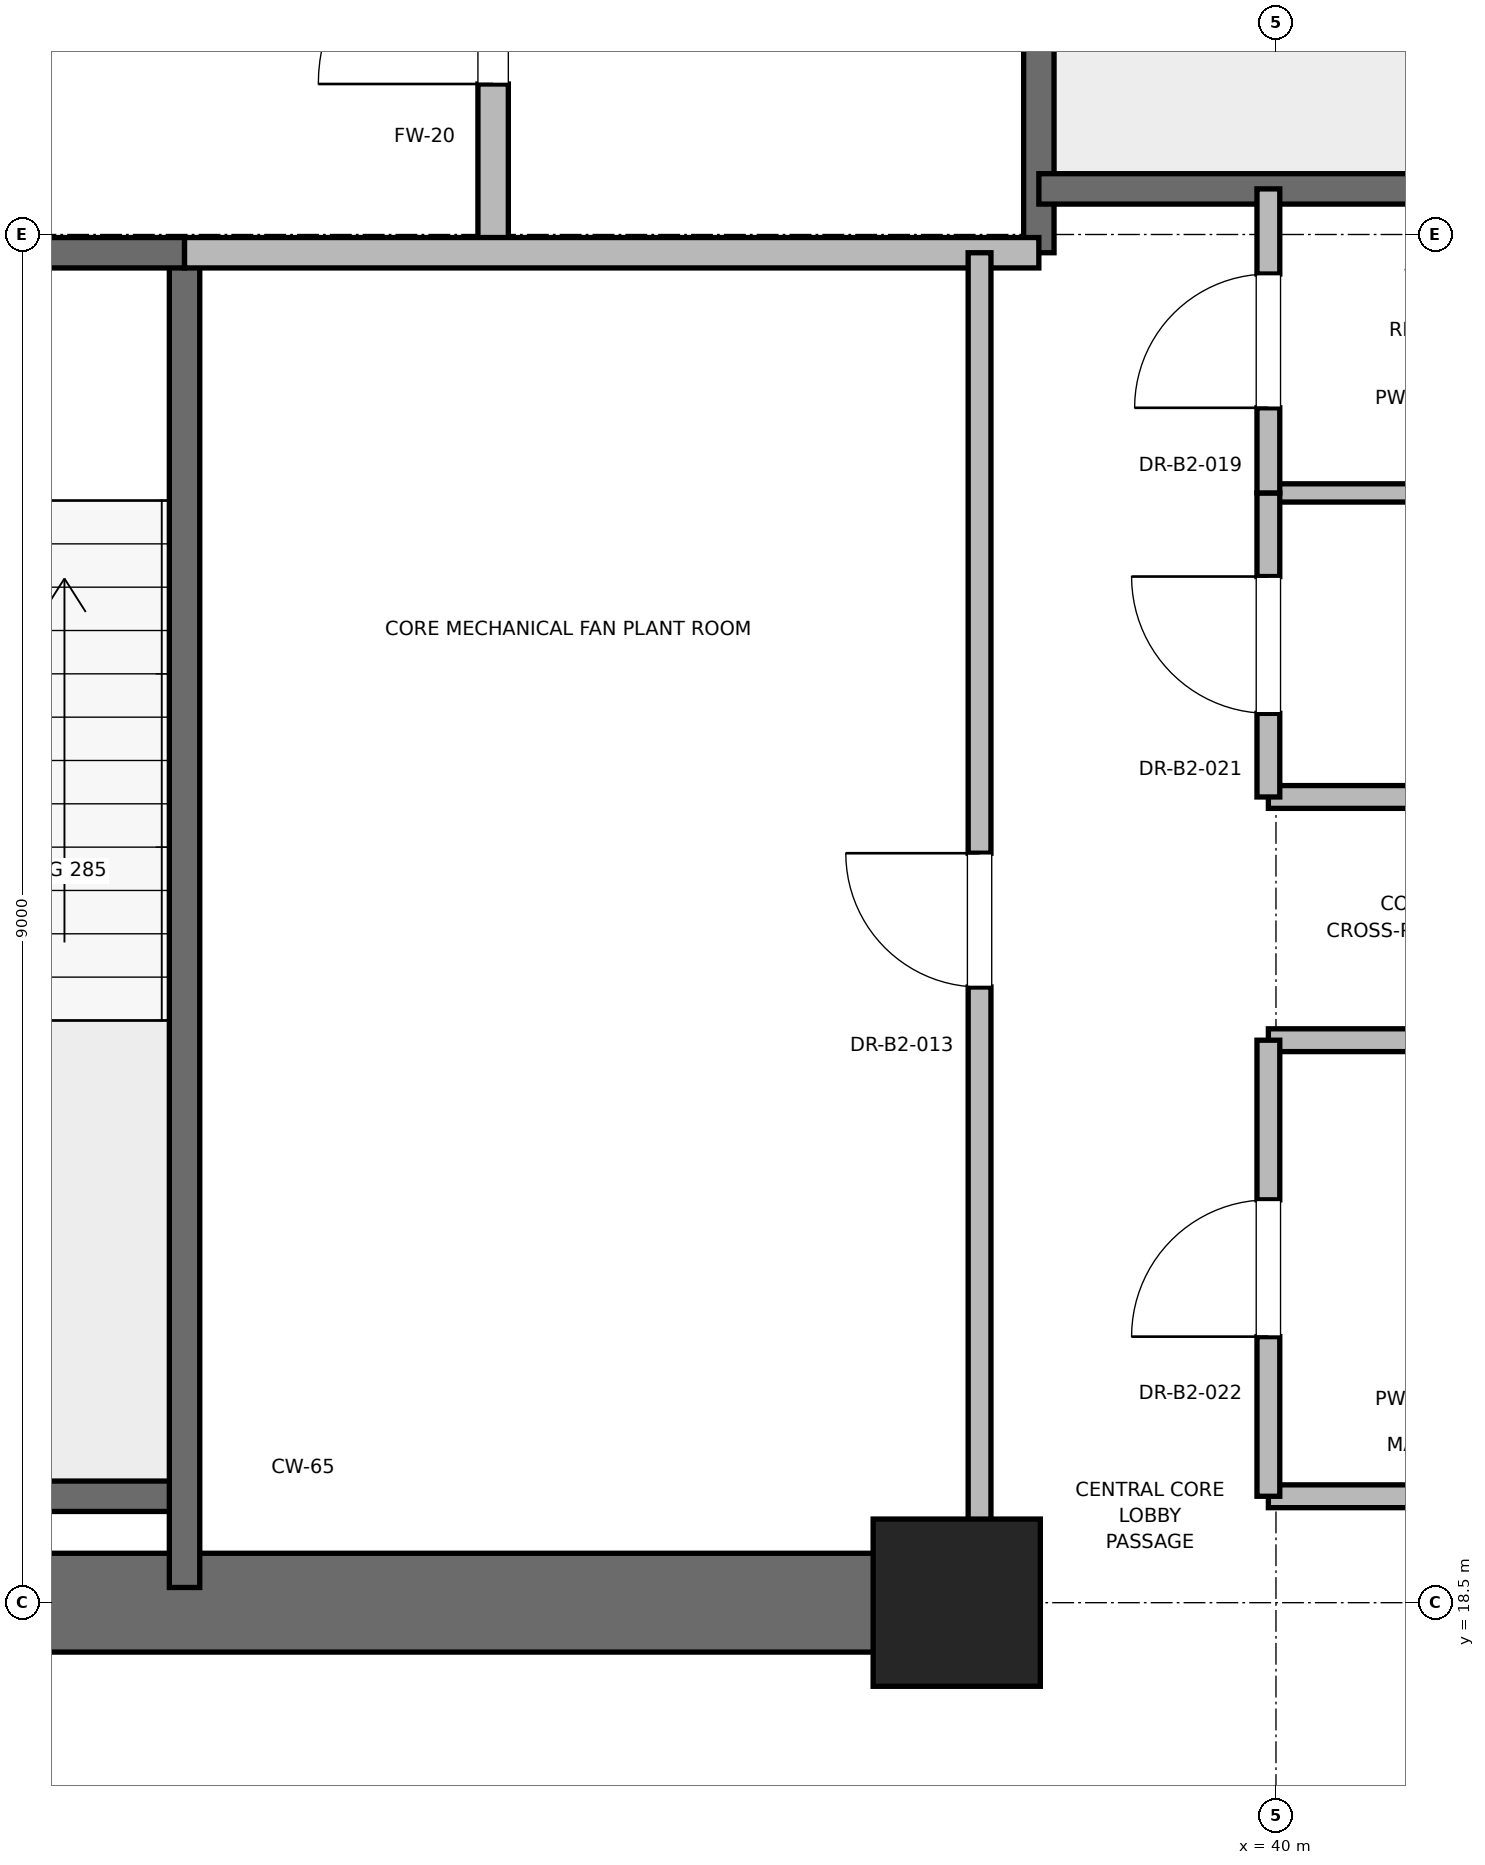
"""IFC4 building model, lengths in metres.
Left out: names, types, materials, properties, quantities, classifications, styles, units other than length and angle.
Written with IfcOpenShell. Run it as: python <this file> out.ifc"""

import sys

from ifc_helpers import new_model, si_unit, direction, frame, frame_2d, origin, origin_2d, place, context, subcontext, project, spatial, rectangle, extrude, element, fill, save


model = new_model("IFC4")
c1 = context("Model", 3, precision=1e-05, world=origin(), true_north=direction((0.0, 1.0)))
c2 = subcontext(c1, "Body", "Model", "MODEL_VIEW")
j1 = project(units=[si_unit("LENGTHUNIT", "METRE"), si_unit("PLANEANGLEUNIT", "RADIAN")], contexts=[c1])
p1 = place(None, origin())
s1 = spatial("IfcSite", under=j1, at=p1, CompositionType="ELEMENT")
p2 = place(p1, origin())
s2 = spatial("IfcBuilding", under=s1, at=p2, CompositionType="ELEMENT")
p3 = place(p2, frame((0.0, 0.0, -9.0)))
s3 = spatial("IfcBuildingStorey", under=s2, at=p3, CompositionType="ELEMENT", Elevation=-9.0)
p4 = place(p3, frame((37.9, 18.5, -0.3), z_axis=(0.0, 0.0, 1.0), x_axis=(1.0, 0.0, 0.0)))
e1 = element("IfcColumn", 1, at=p4, inside=s3, PredefinedType="PILASTER", context=c2, shape_type="SweptSolid", body=[
    extrude(rectangle(XDim=1.1, YDim=1.1, at=origin_2d()), origin(), (0.0, 0.0, 1.0), 4.8),
])
p5 = place(p3, frame((29.0, 18.5, -0.3), z_axis=(0.0, 0.0, 1.0), x_axis=(1.0, 0.0, 0.0)))
e2 = element("IfcWall", 2, at=p5, inside=s3, PredefinedType="SHEAR", context=c2, shape_type="SweptSolid", body=[
    extrude(rectangle(XDim=9.2, YDim=0.65, at=frame_2d((4.6, 0.0))), origin(), (0.0, 0.0, 1.0), 4.5),
])
p6 = place(p3, frame((29.7, 19.2, -0.3), z_axis=(0.0, 0.0, 1.0), x_axis=(1.0, 0.0, 0.0)))
e3 = element("IfcWall", 3, at=p6, inside=s3, PredefinedType="SOLIDWALL", context=c2, shape_type="SweptSolid", body=[
    extrude(rectangle(XDim=3.12, YDim=0.2, at=frame_2d((1.56, 0.0))), origin(), (0.0, 0.0, 1.0), 4.5),
])
p7 = place(p3, frame((32.82, 18.6, -0.3), z_axis=(0.0, 0.0, 1.0), x_axis=(0.0, 1.0, 0.0)))
e4 = element("IfcWall", 4, at=p7, inside=s3, PredefinedType="SOLIDWALL", context=c2, shape_type="SweptSolid", body=[
    extrude(rectangle(XDim=8.78, YDim=0.2, at=frame_2d((4.39, 0.0))), origin(), (0.0, 0.0, 1.0), 4.5),
])
p8 = place(p3, frame((29.7, 27.38, -0.3), z_axis=(0.0, 0.0, 1.0), x_axis=(1.0, 0.0, 0.0)))
e5 = element("IfcWall", 5, at=p8, inside=s3, PredefinedType="SOLIDWALL", context=c2, shape_type="SweptSolid", body=[
    extrude(rectangle(XDim=3.12, YDim=0.2, at=frame_2d((1.56, 0.0))), origin(), (0.0, 0.0, 1.0), 4.5),
])
p9 = place(p8, frame((1.01, 0.0, 0.3)))
e6 = element("IfcOpeningElement", 6, at=p9, cuts=e5, PredefinedType="OPENING", context=c2, shape_type="SweptSolid", body=[
    extrude(rectangle(XDim=1.1, YDim=2.15, at=frame_2d((0.55, 1.075))), frame((0.0, 0.1, 0.0), z_axis=(0.0, -1.0, 0.0), x_axis=(1.0, 0.0, 0.0)), (0.0, 0.0, 1.0), 0.2),
])
p10 = place(p3, frame((38.44, 27.38, -0.3), z_axis=(0.0, 0.0, 1.0), x_axis=(0.0, 1.0, 0.0)))
e7 = element("IfcWall", 7, at=p10, inside=s3, PredefinedType="SOLIDWALL", context=c2, shape_type="SweptSolid", body=[
    extrude(rectangle(XDim=8.87, YDim=0.2, at=frame_2d((4.435, 0.0))), origin(), (0.0, 0.0, 1.0), 4.5),
])
p11 = place(p3, frame((38.44, 27.8, -0.3), z_axis=(0.0, 0.0, 1.0), x_axis=(1.0, 0.0, 0.0)))
e8 = element("IfcWall", 8, at=p11, inside=s3, PredefinedType="SOLIDWALL", context=c2, shape_type="SweptSolid", body=[
    extrude(rectangle(XDim=3.32, YDim=0.2, at=frame_2d((1.66, 0.0))), origin(), (0.0, 0.0, 1.0), 4.5),
])
p12 = place(p3, frame((34.85, 27.38, 0.0), z_axis=(0.0, 0.0, 1.0), x_axis=(0.0, 1.0, 0.0)))
e9 = element("IfcWall", 9, at=p12, inside=s3, PredefinedType="PARTITIONING", context=c2, shape_type="SweptSolid", body=[
    extrude(rectangle(XDim=3.37, YDim=0.2, at=frame_2d((1.685, 0.0))), origin(), (0.0, 0.0, 1.0), 4.2),
])
p13 = place(p12, frame((1.11, 0.0, 0.0)))
e10 = element("IfcOpeningElement", 10, at=p13, cuts=e9, PredefinedType="OPENING", context=c2, shape_type="SweptSolid", body=[
    extrude(rectangle(XDim=1.15, YDim=2.2, at=frame_2d((0.575, 1.1))), frame((0.0, 0.1, 0.0), z_axis=(0.0, -1.0, 0.0), x_axis=(1.0, 0.0, 0.0)), (0.0, 0.0, 1.0), 0.2),
])
p14 = place(p3, frame((32.82, 27.38, 0.0), z_axis=(0.0, 0.0, 1.0), x_axis=(1.0, 0.0, 0.0)))
e11 = element("IfcWall", 11, at=p14, inside=s3, PredefinedType="PARTITIONING", context=c2, shape_type="SweptSolid", body=[
    extrude(rectangle(XDim=5.62, YDim=0.2, at=frame_2d((2.81, 0.0))), origin(), (0.0, 0.0, 1.0), 4.2),
])
for number, where, z_axis, x_axis in (
    (12, (39.95, 19.2, 0.0), (0.0, 0.0, 1.0), (1.0, 0.0, 0.0)),
    (13, (39.95, 22.2, 0.0), (0.0, 0.0, 1.0), (1.0, 0.0, 0.0)),
    (14, (39.95, 23.8, 0.0), (0.0, 0.0, 1.0), (1.0, 0.0, 0.0)),
):
    element("IfcWall", number, at=place(p3, frame(where, z_axis=z_axis, x_axis=x_axis)), inside=s3, PredefinedType="PARTITIONING", context=c2, shape_type="SweptSolid", body=[
        extrude(rectangle(XDim=1.81, YDim=0.15, at=frame_2d((0.905, 0.0))), origin(), (0.0, 0.0, 1.0), 2.85),
    ])
p15 = place(p3, frame((39.95, 25.8, 0.0), z_axis=(0.0, 0.0, 1.0), x_axis=(1.0, 0.0, 0.0)))
e15 = element("IfcWall", 15, at=p15, inside=s3, PredefinedType="PARTITIONING", context=c2, shape_type="SweptSolid", body=[
    extrude(rectangle(XDim=1.81, YDim=0.12, at=frame_2d((0.905, 0.0))), origin(), (0.0, 0.0, 1.0), 2.85),
])
p16 = place(p3, frame((39.95, 19.2, 0.0), z_axis=(0.0, 0.0, 1.0), x_axis=(0.0, 1.0, 0.0)))
e16 = element("IfcWall", 16, at=p16, inside=s3, PredefinedType="PARTITIONING", context=c2, shape_type="SweptSolid", body=[
    extrude(rectangle(XDim=3.0, YDim=0.15, at=frame_2d((1.5, 0.0))), origin(), (0.0, 0.0, 1.0), 2.85),
])
p17 = place(p16, frame((1.05, 0.0, 0.0)))
e17 = element("IfcOpeningElement", 17, at=p17, cuts=e16, PredefinedType="OPENING", context=c2, shape_type="SweptSolid", body=[
    extrude(rectangle(XDim=0.9, YDim=2.1, at=frame_2d((0.45, 1.05))), frame((0.0, 0.075, 0.0), z_axis=(0.0, -1.0, 0.0), x_axis=(1.0, 0.0, 0.0)), (0.0, 0.0, 1.0), 0.15),
])
p18 = place(p3, frame((39.95, 23.8, 0.0), z_axis=(0.0, 0.0, 1.0), x_axis=(0.0, 1.0, 0.0)))
e18 = element("IfcWall", 18, at=p18, inside=s3, PredefinedType="PARTITIONING", context=c2, shape_type="SweptSolid", body=[
    extrude(rectangle(XDim=2.0, YDim=0.15, at=frame_2d((1.0, 0.0))), origin(), (0.0, 0.0, 1.0), 2.85),
])
p19 = place(p18, frame((0.55, 0.0, 0.0)))
e19 = element("IfcOpeningElement", 19, at=p19, cuts=e18, PredefinedType="OPENING", context=c2, shape_type="SweptSolid", body=[
    extrude(rectangle(XDim=0.9, YDim=2.1, at=frame_2d((0.45, 1.05))), frame((0.0, 0.075, 0.0), z_axis=(0.0, -1.0, 0.0), x_axis=(1.0, 0.0, 0.0)), (0.0, 0.0, 1.0), 0.15),
])
p20 = place(p3, frame((39.95, 25.8, 0.0), z_axis=(0.0, 0.0, 1.0), x_axis=(0.0, 1.0, 0.0)))
e20 = element("IfcWall", 20, at=p20, inside=s3, PredefinedType="PARTITIONING", context=c2, shape_type="SweptSolid", body=[
    extrude(rectangle(XDim=2.0, YDim=0.15, at=frame_2d((1.0, 0.0))), origin(), (0.0, 0.0, 1.0), 2.85),
])
p21 = place(p20, frame((0.56, 0.0, 0.0)))
e21 = element("IfcOpeningElement", 21, at=p21, cuts=e20, PredefinedType="OPENING", context=c2, shape_type="SweptSolid", body=[
    extrude(rectangle(XDim=0.88, YDim=2.1, at=frame_2d((0.44, 1.05))), frame((0.0, 0.075, 0.0), z_axis=(0.0, -1.0, 0.0), x_axis=(1.0, 0.0, 0.0)), (0.0, 0.0, 1.0), 0.15),
])
p22 = place(p3, frame((38.05, 18.6, 0.0), z_axis=(0.0, 0.0, 1.0), x_axis=(0.0, 1.0, 0.0)))
e22 = element("IfcWall", 22, at=p22, inside=s3, PredefinedType="PARTITIONING", context=c2, shape_type="SweptSolid", body=[
    extrude(rectangle(XDim=8.78, YDim=0.15, at=frame_2d((4.39, 0.0))), origin(), (0.0, 0.0, 1.0), 2.85),
])
p23 = place(p22, frame((3.95, 0.0, 0.0)))
e23 = element("IfcOpeningElement", 23, at=p23, cuts=e22, PredefinedType="OPENING", context=c2, shape_type="SweptSolid", body=[
    extrude(rectangle(XDim=0.88, YDim=2.1, at=frame_2d((0.44, 1.05))), frame((0.0, 0.075, 0.0), z_axis=(0.0, -1.0, 0.0), x_axis=(1.0, 0.0, 0.0)), (0.0, 0.0, 1.0), 0.15),
])
p24 = place(p13, origin())
e24 = element("IfcDoor", 24, at=p24, inside=s3, OperationType="SINGLE_SWING_LEFT", PredefinedType="DOOR", context=c2, shape_type="SweptSolid", body=[
    extrude(rectangle(XDim=1.15, YDim=2.2, at=frame_2d((0.575, 1.1))), frame((0.0, 0.025, 0.0), z_axis=(0.0, -1.0, 0.0), x_axis=(1.0, 0.0, 0.0)), (0.0, 0.0, 1.0), 0.05),
])
fill(e10, e24)
p25 = place(p17, origin())
e25 = element("IfcDoor", 25, at=p25, inside=s3, OperationType="SINGLE_SWING_LEFT", PredefinedType="DOOR", context=c2, shape_type="SweptSolid", body=[
    extrude(rectangle(XDim=0.9, YDim=2.1, at=frame_2d((0.45, 1.05))), frame((0.0, 0.025, 0.0), z_axis=(0.0, -1.0, 0.0), x_axis=(1.0, 0.0, 0.0)), (0.0, 0.0, 1.0), 0.05),
])
fill(e17, e25)
p26 = place(p19, origin())
e26 = element("IfcDoor", 26, at=p26, inside=s3, OperationType="SINGLE_SWING_RIGHT", PredefinedType="DOOR", context=c2, shape_type="SweptSolid", body=[
    extrude(rectangle(XDim=0.9, YDim=2.1, at=frame_2d((0.45, 1.05))), frame((0.0, 0.025, 0.0), z_axis=(0.0, -1.0, 0.0), x_axis=(1.0, 0.0, 0.0)), (0.0, 0.0, 1.0), 0.05),
])
fill(e19, e26)
p27 = place(p21, origin())
e27 = element("IfcDoor", 27, at=p27, inside=s3, OperationType="SINGLE_SWING_LEFT", PredefinedType="DOOR", context=c2, shape_type="SweptSolid", body=[
    extrude(rectangle(XDim=0.88, YDim=2.1, at=frame_2d((0.44, 1.05))), frame((0.0, 0.025, 0.0), z_axis=(0.0, -1.0, 0.0), x_axis=(1.0, 0.0, 0.0)), (0.0, 0.0, 1.0), 0.05),
])
fill(e21, e27)
p28 = place(p23, origin())
e28 = element("IfcDoor", 28, at=p28, inside=s3, OperationType="SINGLE_SWING_RIGHT", PredefinedType="DOOR", context=c2, shape_type="SweptSolid", body=[
    extrude(rectangle(XDim=0.88, YDim=2.1, at=frame_2d((0.44, 1.05))), frame((0.0, 0.025, 0.0), z_axis=(0.0, -1.0, 0.0), x_axis=(1.0, 0.0, 0.0)), (0.0, 0.0, 1.0), 0.05),
])
fill(e23, e28)
save(model, sys.argv[1])
